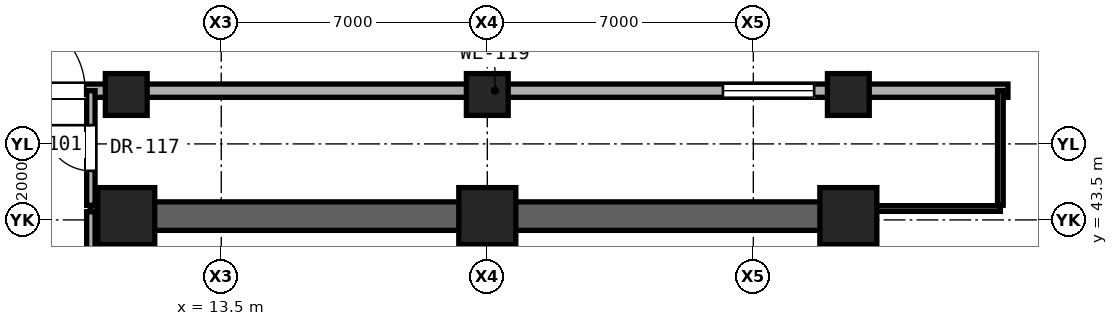
"""IFC4 building model, lengths in metres.
Left out: names, types, materials, properties, quantities, classifications, styles, units other than length and angle.
Written with IfcOpenShell. Run it as: python <this file> out.ifc"""

import sys

from ifc_helpers import new_model, si_unit, direction, frame, frame_2d, origin, origin_2d, place, context, subcontext, project, spatial, rectangle, extrude, element, fill, save


model = new_model("IFC4")
c1 = context("Model", 3, precision=1e-05, world=origin(), true_north=direction((0.0, 1.0)))
c2 = subcontext(c1, "Body", "Model", "MODEL_VIEW")
j1 = project(units=[si_unit("LENGTHUNIT", "METRE"), si_unit("PLANEANGLEUNIT", "RADIAN")], contexts=[c1])
p1 = place(None, origin())
s1 = spatial("IfcSite", under=j1, at=p1, CompositionType="ELEMENT")
p2 = place(p1, origin())
s2 = spatial("IfcBuilding", under=s1, at=p2, CompositionType="ELEMENT")
p3 = place(p2, origin())
s3 = spatial("IfcBuildingStorey", under=s2, at=p3, CompositionType="ELEMENT", Elevation=0.0)
for number, where, z_axis, x_axis in (
    (1, (11.0, 43.6, 0.0), (0.0, 0.0, 1.0), (1.0, 0.0, 0.0)),
    (2, (20.5, 43.6, 0.0), (0.0, 0.0, 1.0), (1.0, 0.0, 0.0)),
    (3, (30.0, 43.6, 0.0), (0.0, 0.0, 1.0), (1.0, 0.0, 0.0)),
):
    element("IfcColumn", number, at=place(p3, frame(where, z_axis=z_axis, x_axis=x_axis)), inside=s3, PredefinedType="COLUMN", context=c2, shape_type="SweptSolid", body=[
        extrude(rectangle(XDim=1.5, YDim=1.5, at=origin_2d()), origin(), (0.0, 0.0, 1.0), 5.2),
    ])
p4 = place(p3, frame((11.0, 43.6, 0.0), z_axis=(0.0, 0.0, 1.0), x_axis=(1.0, 0.0, 0.0)))
e4 = element("IfcWall", 4, at=p4, inside=s3, PredefinedType="SHEAR", context=c2, shape_type="SweptSolid", body=[
    extrude(rectangle(XDim=19.0, YDim=0.75, at=frame_2d((9.5, 0.0))), origin(), (0.0, 0.0, 1.0), 4.88),
])
for number, where, z_axis, x_axis in (
    (5, (11.0, 37.6, 0.0), (0.0, 0.0, 1.0), (0.0, 1.0, 0.0)),
    (6, (30.0, 37.6, 0.0), (0.0, 0.0, 1.0), (0.0, 1.0, 0.0)),
):
    element("IfcWall", number, at=place(p3, frame(where, z_axis=z_axis, x_axis=x_axis)), inside=s3, PredefinedType="SHEAR", context=c2, shape_type="SweptSolid", body=[
        extrude(rectangle(XDim=6.0, YDim=0.75, at=frame_2d((3.0, 0.0))), origin(), (0.0, 0.0, 1.0), 4.88),
    ])
for number, where, z_axis, x_axis in (
    (7, (11.0, 46.8, 0.0), (0.0, 0.0, 1.0), (1.0, 0.0, 0.0)),
    (8, (20.5, 46.8, 0.0), (0.0, 0.0, 1.0), (1.0, 0.0, 0.0)),
    (9, (30.0, 46.8, 0.0), (0.0, 0.0, 1.0), (1.0, 0.0, 0.0)),
):
    element("IfcColumn", number, at=place(p3, frame(where, z_axis=z_axis, x_axis=x_axis)), inside=s3, PredefinedType="COLUMN", context=c2, shape_type="SweptSolid", body=[
        extrude(rectangle(XDim=1.1, YDim=1.1, at=origin_2d()), origin(), (0.0, 0.0, 1.0), 5.2),
    ])
p5 = place(p3, frame((7.2, 46.9, 0.0), z_axis=(0.0, 0.0, 1.0), x_axis=(1.0, 0.0, 0.0)))
e10 = element("IfcWall", 10, at=p5, inside=s3, PredefinedType="SOLIDWALL", context=c2, shape_type="SweptSolid", body=[
    extrude(rectangle(XDim=27.0, YDim=0.35, at=frame_2d((13.5, 0.0))), origin(), (0.0, 0.0, 1.0), 4.099),
])
p6 = place(p5, frame((19.5, 0.0, 0.85)))
e11 = element("IfcOpeningElement", 11, at=p6, cuts=e10, PredefinedType="OPENING", context=c2, shape_type="SweptSolid", body=[
    extrude(rectangle(XDim=2.4, YDim=2.6, at=frame_2d((1.2, 1.3))), frame((0.0, 0.185, 0.0), z_axis=(0.0, -1.0, 0.0), x_axis=(1.0, 0.0, 0.0)), (0.0, 0.0, 1.0), 0.37),
])
p7 = place(p5, frame((0.72, 0.0, 0.0)))
e12 = element("IfcOpeningElement", 12, at=p7, cuts=e10, PredefinedType="OPENING", context=c2, shape_type="SweptSolid", body=[
    extrude(rectangle(XDim=2.0, YDim=2.4, at=frame_2d((1.0, 1.2))), frame((0.0, 0.185, 0.0), z_axis=(0.0, -1.0, 0.0), x_axis=(1.0, 0.0, 0.0)), (0.0, 0.0, 1.0), 0.37),
])
p8 = place(p3, frame((10.05, 43.8, 0.0), z_axis=(0.0, 0.0, 1.0), x_axis=(1.0, 0.0, 0.0)))
e13 = element("IfcWall", 13, at=p8, inside=s3, PredefinedType="PARTITIONING", context=c2, shape_type="SweptSolid", body=[
    extrude(rectangle(XDim=0.93, YDim=0.15, at=frame_2d((0.465, 0.0))), origin(), (0.0, 0.0, 1.0), 4.099),
])
p9 = place(p3, frame((30.02, 43.8, 0.0), z_axis=(0.0, 0.0, 1.0), x_axis=(1.0, 0.0, 0.0)))
e14 = element("IfcWall", 14, at=p9, inside=s3, PredefinedType="PARTITIONING", context=c2, shape_type="SweptSolid", body=[
    extrude(rectangle(XDim=3.98, YDim=0.15, at=frame_2d((1.99, 0.0))), origin(), (0.0, 0.0, 1.0), 3.924),
])
p10 = place(p3, frame((10.069, 37.702, 0.0), z_axis=(0.0, 0.0, 1.0), x_axis=(0.0, 1.0, 0.0)))
e15 = element("IfcWall", 15, at=p10, inside=s3, PredefinedType="SOLIDWALL", context=c2, shape_type="SweptSolid", body=[
    extrude(rectangle(XDim=6.013, YDim=0.22, at=frame_2d((3.006, 0.0))), origin(), (0.0, 0.0, 1.0), 3.772),
])
p11 = place(p3, frame((10.069, 43.885, 0.0), z_axis=(0.0, 0.0, 1.0), x_axis=(0.0, 1.0, 0.0)))
e16 = element("IfcWall", 16, at=p11, inside=s3, PredefinedType="SOLIDWALL", context=c2, shape_type="SweptSolid", body=[
    extrude(rectangle(XDim=3.015, YDim=0.22, at=frame_2d((1.507, 0.0))), origin(), (0.0, 0.0, 1.0), 4.88),
])
p12 = place(p11, frame((0.907, 0.0, 0.0)))
e17 = element("IfcOpeningElement", 17, at=p12, cuts=e16, PredefinedType="OPENING", context=c2, shape_type="SweptSolid", body=[
    extrude(rectangle(XDim=1.2, YDim=2.25, at=frame_2d((0.6, 1.125))), frame((0.0, 0.12, 0.0), z_axis=(0.0, -1.0, 0.0), x_axis=(1.0, 0.0, 0.0)), (0.0, 0.0, 1.0), 0.24),
])
p13 = place(p3, frame((34.0, 43.885, 0.0), z_axis=(0.0, 0.0, 1.0), x_axis=(0.0, 1.0, 0.0)))
e18 = element("IfcWall", 18, at=p13, inside=s3, PredefinedType="PARTITIONING", context=c2, shape_type="SweptSolid", body=[
    extrude(rectangle(XDim=3.015, YDim=0.15, at=frame_2d((1.507, 0.0))), origin(), (0.0, 0.0, 1.0), 4.099),
])
p14 = place(p6, origin())
e19 = element("IfcWindow", 19, at=p14, inside=s3, PartitioningType="SINGLE_PANEL", PredefinedType="WINDOW", context=c2, shape_type="SweptSolid", body=[
    extrude(rectangle(XDim=2.4, YDim=2.6, at=frame_2d((1.2, 1.3))), frame((0.0, 0.03, 0.0), z_axis=(0.0, -1.0, 0.0), x_axis=(1.0, 0.0, 0.0)), (0.0, 0.0, 1.0), 0.06),
])
fill(e11, e19)
p15 = place(p7, origin())
e20 = element("IfcDoor", 20, at=p15, inside=s3, OperationType="SINGLE_SWING_LEFT", PredefinedType="DOOR", context=c2, shape_type="SweptSolid", body=[
    extrude(rectangle(XDim=2.0, YDim=2.4, at=frame_2d((1.0, 1.2))), frame((0.0, 0.025, 0.0), z_axis=(0.0, -1.0, 0.0), x_axis=(1.0, 0.0, 0.0)), (0.0, 0.0, 1.0), 0.05),
])
fill(e12, e20)
p16 = place(p12, origin())
e21 = element("IfcDoor", 21, at=p16, inside=s3, OperationType="SINGLE_SWING_RIGHT", PredefinedType="DOOR", context=c2, shape_type="SweptSolid", body=[
    extrude(rectangle(XDim=1.2, YDim=2.25, at=frame_2d((0.6, 1.125))), frame((0.0, 0.025, 0.0), z_axis=(0.0, -1.0, 0.0), x_axis=(1.0, 0.0, 0.0)), (0.0, 0.0, 1.0), 0.05),
])
fill(e17, e21)
save(model, sys.argv[1])
